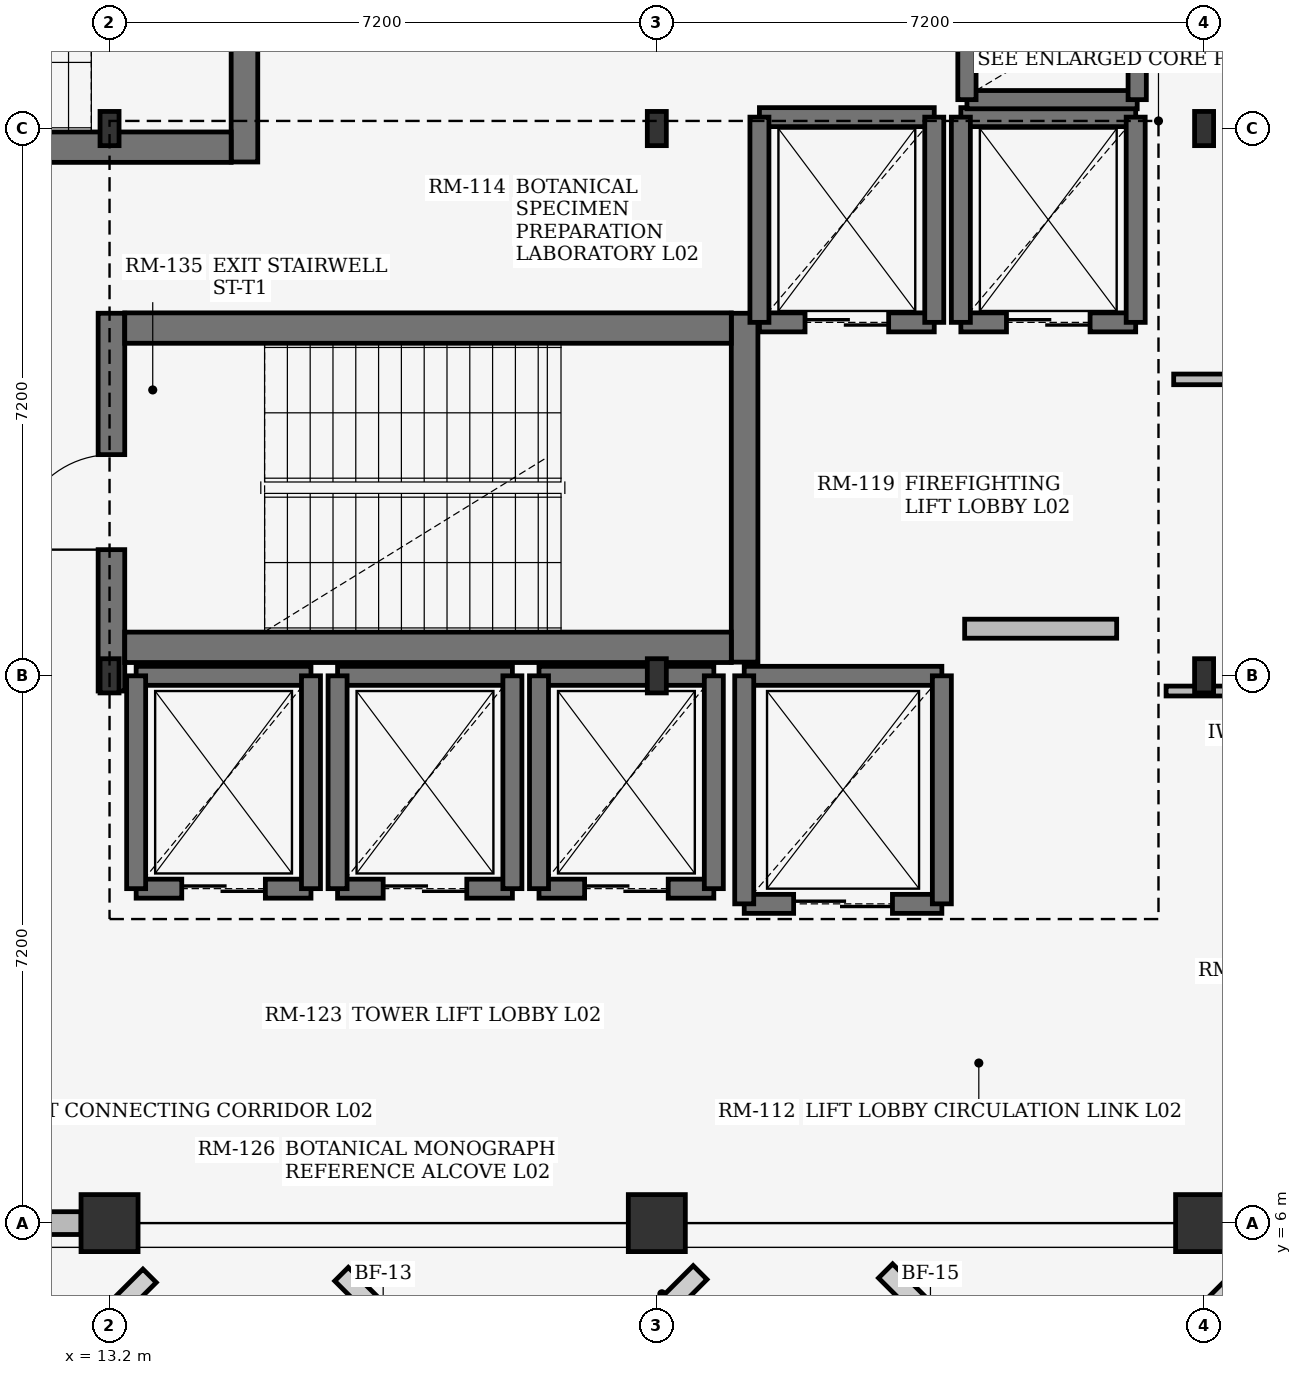
"""IFC4 building model, lengths in metres.
Left out: names, types, materials, properties, quantities, classifications, styles, units other than length and angle.
Written with IfcOpenShell. Run it as: python <this file> out.ifc"""

import sys

from ifc_helpers import new_model, si_unit, direction, frame, frame_2d, origin, origin_2d, place, context, subcontext, project, spatial, rectangle, i_section, extrude, element, fill, save


model = new_model("IFC4")
c1 = context("Model", 3, precision=1e-05, world=origin(), true_north=direction((0.0, 1.0)))
c2 = subcontext(c1, "Body", "Model", "MODEL_VIEW")
j1 = project(units=[si_unit("LENGTHUNIT", "METRE"), si_unit("PLANEANGLEUNIT", "RADIAN")], contexts=[c1])
p1 = place(None, origin())
s1 = spatial("IfcSite", under=j1, at=p1, CompositionType="ELEMENT")
p2 = place(p1, origin())
s2 = spatial("IfcBuilding", under=s1, at=p2, CompositionType="ELEMENT")
p3 = place(p2, frame((0.0, 0.0, 9.0)))
s3 = spatial("IfcBuildingStorey", under=s2, at=p3, CompositionType="ELEMENT", Elevation=9.0)
p4 = place(p3, frame((13.2, 6.0, 0.0), z_axis=(0.0, 0.0, 1.0), x_axis=(1.0, 0.0, 0.0)))
e1 = element("IfcColumn", 1, at=p4, inside=s3, PredefinedType="COLUMN", context=c2, shape_type="SweptSolid", body=[
    extrude(rectangle(XDim=0.75, YDim=0.75, at=origin_2d()), origin(), (0.0, 0.0, 1.0), 3.96),
])
for number, where, z_axis, x_axis in (
    (2, (13.2, 13.2, 0.0), (0.0, 0.0, 1.0), (1.0, 0.0, 0.0)),
    (3, (13.2, 20.4, 0.0), (0.0, 0.0, 1.0), (1.0, 0.0, 0.0)),
):
    element("IfcColumn", number, at=place(p3, frame(where, z_axis=z_axis, x_axis=x_axis)), inside=s3, PredefinedType="COLUMN", context=c2, shape_type="SweptSolid", body=[
        extrude(i_section(OverallWidth=0.25, OverallDepth=0.45, WebThickness=0.011, FlangeThickness=0.014, at=origin_2d()), origin(), (0.0, 0.0, 1.0), 3.96),
    ])
p5 = place(p3, frame((20.4, 6.0, 0.0), z_axis=(0.0, 0.0, 1.0), x_axis=(1.0, 0.0, 0.0)))
e4 = element("IfcColumn", 4, at=p5, inside=s3, PredefinedType="COLUMN", context=c2, shape_type="SweptSolid", body=[
    extrude(rectangle(XDim=0.75, YDim=0.75, at=origin_2d()), origin(), (0.0, 0.0, 1.0), 3.96),
])
for number, where, z_axis, x_axis in (
    (5, (20.4, 13.2, 0.0), (0.0, 0.0, 1.0), (1.0, 0.0, 0.0)),
    (6, (20.4, 20.4, 0.0), (0.0, 0.0, 1.0), (1.0, 0.0, 0.0)),
):
    element("IfcColumn", number, at=place(p3, frame(where, z_axis=z_axis, x_axis=x_axis)), inside=s3, PredefinedType="COLUMN", context=c2, shape_type="SweptSolid", body=[
        extrude(i_section(OverallWidth=0.25, OverallDepth=0.45, WebThickness=0.011, FlangeThickness=0.014, at=origin_2d()), origin(), (0.0, 0.0, 1.0), 3.96),
    ])
p6 = place(p3, frame((27.6, 6.0, 0.0), z_axis=(0.0, 0.0, 1.0), x_axis=(1.0, 0.0, 0.0)))
e7 = element("IfcColumn", 7, at=p6, inside=s3, PredefinedType="COLUMN", context=c2, shape_type="SweptSolid", body=[
    extrude(rectangle(XDim=0.75, YDim=0.75, at=origin_2d()), origin(), (0.0, 0.0, 1.0), 3.96),
])
for number, where, z_axis, x_axis in (
    (8, (27.6, 13.2, 0.0), (0.0, 0.0, 1.0), (1.0, 0.0, 0.0)),
    (9, (27.6, 20.4, 0.0), (0.0, 0.0, 1.0), (1.0, 0.0, 0.0)),
):
    element("IfcColumn", number, at=place(p3, frame(where, z_axis=z_axis, x_axis=x_axis)), inside=s3, PredefinedType="COLUMN", context=c2, shape_type="SweptSolid", body=[
        extrude(i_section(OverallWidth=0.25, OverallDepth=0.45, WebThickness=0.011, FlangeThickness=0.014, at=origin_2d()), origin(), (0.0, 0.0, 1.0), 3.96),
    ])
p7 = place(p3, frame((6.375, 6.0, 0.0), z_axis=(0.0, 0.0, 1.0), x_axis=(1.0, 0.0, 0.0)))
e10 = element("IfcWall", 10, at=p7, inside=s3, PredefinedType="STANDARD", context=c2, shape_type="SweptSolid", body=[
    extrude(rectangle(XDim=6.45, YDim=0.3, at=frame_2d((3.225, 0.0))), origin(), (0.0, 0.0, 1.0), 3.34),
])
p8 = place(p7, frame((2.55, 0.0, 0.75)))
e11 = element("IfcOpeningElement", 11, at=p8, cuts=e10, PredefinedType="OPENING", context=c2, shape_type="SweptSolid", body=[
    extrude(rectangle(XDim=1.35, YDim=1.5, at=frame_2d((0.675, 0.75))), frame((0.0, 0.16, 0.0), z_axis=(0.0, -1.0, 0.0), x_axis=(1.0, 0.0, 0.0)), (0.0, 0.0, 1.0), 0.32),
])
p9 = place(p3, frame((13.225, 13.0, 0.0), z_axis=(0.0, 0.0, 1.0), x_axis=(0.0, 1.0, 0.0)))
e12 = element("IfcWall", 12, at=p9, inside=s3, PredefinedType="SHEAR", context=c2, shape_type="SweptSolid", body=[
    extrude(rectangle(XDim=4.97, YDim=0.35, at=frame_2d((2.485, 0.0))), origin(), (0.0, 0.0, 1.0), 3.96),
])
p10 = place(p9, frame((1.86, 0.0, 0.0)))
e13 = element("IfcOpeningElement", 13, at=p10, cuts=e12, PredefinedType="OPENING", context=c2, shape_type="SweptSolid", body=[
    extrude(rectangle(XDim=1.25, YDim=2.2, at=frame_2d((0.625, 1.1))), frame((0.0, 0.185, 0.0), z_axis=(0.0, -1.0, 0.0), x_axis=(1.0, 0.0, 0.0)), (0.0, 0.0, 1.0), 0.37),
])
p11 = place(p3, frame((21.555, 13.38, 0.0), z_axis=(0.0, 0.0, 1.0), x_axis=(0.0, 1.0, 0.0)))
e14 = element("IfcWall", 14, at=p11, inside=s3, PredefinedType="SHEAR", context=c2, shape_type="SweptSolid", body=[
    extrude(rectangle(XDim=4.59, YDim=0.35, at=frame_2d((2.295, 0.0))), origin(), (0.0, 0.0, 1.0), 3.96),
])
for number, where, z_axis, x_axis in (
    (15, (13.4, 13.575, 0.0), (0.0, 0.0, 1.0), (1.0, 0.0, 0.0)),
    (16, (13.4, 17.775, 0.0), (0.0, 0.0, 1.0), (1.0, 0.0, 0.0)),
):
    element("IfcWall", number, at=place(p3, frame(where, z_axis=z_axis, x_axis=x_axis)), inside=s3, PredefinedType="SHEAR", context=c2, shape_type="SweptSolid", body=[
        extrude(rectangle(XDim=7.98, YDim=0.4, at=frame_2d((3.99, 0.0))), origin(), (0.0, 0.0, 1.0), 3.96),
    ])
p12 = place(p3, frame((14.975, 24.55, 0.0), z_axis=(0.0, 0.0, 1.0), x_axis=(0.0, -1.0, 0.0)))
e17 = element("IfcWall", 17, at=p12, inside=s3, PredefinedType="SHEAR", context=c2, shape_type="SweptSolid", body=[
    extrude(rectangle(XDim=4.59, YDim=0.35, at=frame_2d((2.295, 0.0))), origin(), (0.0, 0.0, 1.0), 3.96),
])
p13 = place(p12, frame((1.72, 0.0, 0.0)))
e18 = element("IfcOpeningElement", 18, at=p13, cuts=e17, PredefinedType="OPENING", context=c2, shape_type="SweptSolid", body=[
    extrude(rectangle(XDim=1.15, YDim=2.2, at=frame_2d((0.575, 1.1))), frame((0.0, 0.185, 0.0), z_axis=(0.0, -1.0, 0.0), x_axis=(1.0, 0.0, 0.0)), (0.0, 0.0, 1.0), 0.37),
])
p14 = place(p3, frame((14.8, 20.155, 0.0), z_axis=(0.0, 0.0, 1.0), x_axis=(-1.0, 0.0, 0.0)))
e19 = element("IfcWall", 19, at=p14, inside=s3, PredefinedType="SHEAR", context=c2, shape_type="SweptSolid", body=[
    extrude(rectangle(XDim=7.98, YDim=0.4, at=frame_2d((3.99, 0.0))), origin(), (0.0, 0.0, 1.0), 3.96),
])
p15 = place(p3, frame((21.75, 17.85, 0.0), z_axis=(0.0, 0.0, 1.0), x_axis=(1.0, 0.0, 0.0)))
e20 = element("IfcWall", 20, at=p15, inside=s3, PredefinedType="SHEAR", context=c2, shape_type="SweptSolid", body=[
    extrude(rectangle(XDim=2.3, YDim=0.25, at=frame_2d((1.15, 0.0))), origin(), (0.0, 0.0, 1.0), 3.96),
])
p16 = place(p15, frame((0.6, 0.0, 0.0)))
e21 = element("IfcOpeningElement", 21, at=p16, cuts=e20, PredefinedType="OPENING", context=c2, shape_type="SweptSolid", body=[
    extrude(rectangle(XDim=1.1, YDim=2.2, at=frame_2d((0.55, 1.1))), frame((0.0, 0.135, 0.0), z_axis=(0.0, -1.0, 0.0), x_axis=(1.0, 0.0, 0.0)), (0.0, 0.0, 1.0), 0.27),
])
p17 = place(p3, frame((21.75, 20.55, 0.0), z_axis=(0.0, 0.0, 1.0), x_axis=(1.0, 0.0, 0.0)))
e22 = element("IfcWall", 22, at=p17, inside=s3, PredefinedType="SHEAR", context=c2, shape_type="SweptSolid", body=[
    extrude(rectangle(XDim=2.3, YDim=0.25, at=frame_2d((1.15, 0.0))), origin(), (0.0, 0.0, 1.0), 3.96),
])
for number, where, z_axis, x_axis in (
    (23, (21.75, 17.85, 0.0), (0.0, 0.0, 1.0), (0.0, 1.0, 0.0)),
    (24, (24.05, 17.85, 0.0), (0.0, 0.0, 1.0), (0.0, 1.0, 0.0)),
):
    element("IfcWall", number, at=place(p3, frame(where, z_axis=z_axis, x_axis=x_axis)), inside=s3, PredefinedType="SHEAR", context=c2, shape_type="SweptSolid", body=[
        extrude(rectangle(XDim=2.7, YDim=0.25, at=frame_2d((1.35, 0.0))), origin(), (0.0, 0.0, 1.0), 3.96),
    ])
p18 = place(p3, frame((24.4, 17.85, 0.0), z_axis=(0.0, 0.0, 1.0), x_axis=(1.0, 0.0, 0.0)))
e25 = element("IfcWall", 25, at=p18, inside=s3, PredefinedType="SHEAR", context=c2, shape_type="SweptSolid", body=[
    extrude(rectangle(XDim=2.3, YDim=0.25, at=frame_2d((1.15, 0.0))), origin(), (0.0, 0.0, 1.0), 3.96),
])
p19 = place(p18, frame((0.6, 0.0, 0.0)))
e26 = element("IfcOpeningElement", 26, at=p19, cuts=e25, PredefinedType="OPENING", context=c2, shape_type="SweptSolid", body=[
    extrude(rectangle(XDim=1.1, YDim=2.2, at=frame_2d((0.55, 1.1))), frame((0.0, 0.135, 0.0), z_axis=(0.0, -1.0, 0.0), x_axis=(1.0, 0.0, 0.0)), (0.0, 0.0, 1.0), 0.27),
])
p20 = place(p3, frame((24.4, 20.55, 0.0), z_axis=(0.0, 0.0, 1.0), x_axis=(1.0, 0.0, 0.0)))
e27 = element("IfcWall", 27, at=p20, inside=s3, PredefinedType="SHEAR", context=c2, shape_type="SweptSolid", body=[
    extrude(rectangle(XDim=2.3, YDim=0.25, at=frame_2d((1.15, 0.0))), origin(), (0.0, 0.0, 1.0), 3.96),
])
for number, where, z_axis, x_axis in (
    (28, (24.4, 17.85, 0.0), (0.0, 0.0, 1.0), (0.0, 1.0, 0.0)),
    (29, (26.7, 17.85, 0.0), (0.0, 0.0, 1.0), (0.0, 1.0, 0.0)),
):
    element("IfcWall", number, at=place(p3, frame(where, z_axis=z_axis, x_axis=x_axis)), inside=s3, PredefinedType="SHEAR", context=c2, shape_type="SweptSolid", body=[
        extrude(rectangle(XDim=2.7, YDim=0.25, at=frame_2d((1.35, 0.0))), origin(), (0.0, 0.0, 1.0), 3.96),
    ])
p21 = place(p3, frame((13.55, 10.4, 0.0), z_axis=(0.0, 0.0, 1.0), x_axis=(1.0, 0.0, 0.0)))
e30 = element("IfcWall", 30, at=p21, inside=s3, PredefinedType="SHEAR", context=c2, shape_type="SweptSolid", body=[
    extrude(rectangle(XDim=2.3, YDim=0.25, at=frame_2d((1.15, 0.0))), origin(), (0.0, 0.0, 1.0), 3.96),
])
p22 = place(p21, frame((0.6, 0.0, 0.0)))
e31 = element("IfcOpeningElement", 31, at=p22, cuts=e30, PredefinedType="OPENING", context=c2, shape_type="SweptSolid", body=[
    extrude(rectangle(XDim=1.1, YDim=2.2, at=frame_2d((0.55, 1.1))), frame((0.0, 0.135, 0.0), z_axis=(0.0, -1.0, 0.0), x_axis=(1.0, 0.0, 0.0)), (0.0, 0.0, 1.0), 0.27),
])
p23 = place(p3, frame((13.55, 13.2, 0.0), z_axis=(0.0, 0.0, 1.0), x_axis=(1.0, 0.0, 0.0)))
e32 = element("IfcWall", 32, at=p23, inside=s3, PredefinedType="SHEAR", context=c2, shape_type="SweptSolid", body=[
    extrude(rectangle(XDim=2.3, YDim=0.25, at=frame_2d((1.15, 0.0))), origin(), (0.0, 0.0, 1.0), 3.96),
])
for number, where, z_axis, x_axis in (
    (33, (13.55, 10.4, 0.0), (0.0, 0.0, 1.0), (0.0, 1.0, 0.0)),
    (34, (15.85, 10.4, 0.0), (0.0, 0.0, 1.0), (0.0, 1.0, 0.0)),
):
    element("IfcWall", number, at=place(p3, frame(where, z_axis=z_axis, x_axis=x_axis)), inside=s3, PredefinedType="SHEAR", context=c2, shape_type="SweptSolid", body=[
        extrude(rectangle(XDim=2.8, YDim=0.25, at=frame_2d((1.4, 0.0))), origin(), (0.0, 0.0, 1.0), 3.96),
    ])
p24 = place(p3, frame((16.2, 10.4, 0.0), z_axis=(0.0, 0.0, 1.0), x_axis=(1.0, 0.0, 0.0)))
e35 = element("IfcWall", 35, at=p24, inside=s3, PredefinedType="SHEAR", context=c2, shape_type="SweptSolid", body=[
    extrude(rectangle(XDim=2.3, YDim=0.25, at=frame_2d((1.15, 0.0))), origin(), (0.0, 0.0, 1.0), 3.96),
])
p25 = place(p24, frame((0.6, 0.0, 0.0)))
e36 = element("IfcOpeningElement", 36, at=p25, cuts=e35, PredefinedType="OPENING", context=c2, shape_type="SweptSolid", body=[
    extrude(rectangle(XDim=1.1, YDim=2.2, at=frame_2d((0.55, 1.1))), frame((0.0, 0.135, 0.0), z_axis=(0.0, -1.0, 0.0), x_axis=(1.0, 0.0, 0.0)), (0.0, 0.0, 1.0), 0.27),
])
p26 = place(p3, frame((16.2, 13.2, 0.0), z_axis=(0.0, 0.0, 1.0), x_axis=(1.0, 0.0, 0.0)))
e37 = element("IfcWall", 37, at=p26, inside=s3, PredefinedType="SHEAR", context=c2, shape_type="SweptSolid", body=[
    extrude(rectangle(XDim=2.3, YDim=0.25, at=frame_2d((1.15, 0.0))), origin(), (0.0, 0.0, 1.0), 3.96),
])
for number, where, z_axis, x_axis in (
    (38, (16.2, 10.4, 0.0), (0.0, 0.0, 1.0), (0.0, 1.0, 0.0)),
    (39, (18.5, 10.4, 0.0), (0.0, 0.0, 1.0), (0.0, 1.0, 0.0)),
):
    element("IfcWall", number, at=place(p3, frame(where, z_axis=z_axis, x_axis=x_axis)), inside=s3, PredefinedType="SHEAR", context=c2, shape_type="SweptSolid", body=[
        extrude(rectangle(XDim=2.8, YDim=0.25, at=frame_2d((1.4, 0.0))), origin(), (0.0, 0.0, 1.0), 3.96),
    ])
p27 = place(p3, frame((18.85, 10.4, 0.0), z_axis=(0.0, 0.0, 1.0), x_axis=(1.0, 0.0, 0.0)))
e40 = element("IfcWall", 40, at=p27, inside=s3, PredefinedType="SHEAR", context=c2, shape_type="SweptSolid", body=[
    extrude(rectangle(XDim=2.3, YDim=0.25, at=frame_2d((1.15, 0.0))), origin(), (0.0, 0.0, 1.0), 3.96),
])
p28 = place(p27, frame((0.6, 0.0, 0.0)))
e41 = element("IfcOpeningElement", 41, at=p28, cuts=e40, PredefinedType="OPENING", context=c2, shape_type="SweptSolid", body=[
    extrude(rectangle(XDim=1.1, YDim=2.2, at=frame_2d((0.55, 1.1))), frame((0.0, 0.135, 0.0), z_axis=(0.0, -1.0, 0.0), x_axis=(1.0, 0.0, 0.0)), (0.0, 0.0, 1.0), 0.27),
])
p29 = place(p3, frame((18.85, 13.2, 0.0), z_axis=(0.0, 0.0, 1.0), x_axis=(1.0, 0.0, 0.0)))
e42 = element("IfcWall", 42, at=p29, inside=s3, PredefinedType="SHEAR", context=c2, shape_type="SweptSolid", body=[
    extrude(rectangle(XDim=2.3, YDim=0.25, at=frame_2d((1.15, 0.0))), origin(), (0.0, 0.0, 1.0), 3.96),
])
for number, where, z_axis, x_axis in (
    (43, (18.85, 10.4, 0.0), (0.0, 0.0, 1.0), (0.0, 1.0, 0.0)),
    (44, (21.15, 10.4, 0.0), (0.0, 0.0, 1.0), (0.0, 1.0, 0.0)),
):
    element("IfcWall", number, at=place(p3, frame(where, z_axis=z_axis, x_axis=x_axis)), inside=s3, PredefinedType="SHEAR", context=c2, shape_type="SweptSolid", body=[
        extrude(rectangle(XDim=2.8, YDim=0.25, at=frame_2d((1.4, 0.0))), origin(), (0.0, 0.0, 1.0), 3.96),
    ])
p30 = place(p3, frame((21.55, 10.2, 0.0), z_axis=(0.0, 0.0, 1.0), x_axis=(1.0, 0.0, 0.0)))
e45 = element("IfcWall", 45, at=p30, inside=s3, PredefinedType="SHEAR", context=c2, shape_type="SweptSolid", body=[
    extrude(rectangle(XDim=2.6, YDim=0.25, at=frame_2d((1.3, 0.0))), origin(), (0.0, 0.0, 1.0), 3.96),
])
p31 = place(p30, frame((0.65, 0.0, 0.0)))
e46 = element("IfcOpeningElement", 46, at=p31, cuts=e45, PredefinedType="OPENING", context=c2, shape_type="SweptSolid", body=[
    extrude(rectangle(XDim=1.3, YDim=2.25, at=frame_2d((0.65, 1.125))), frame((0.0, 0.135, 0.0), z_axis=(0.0, -1.0, 0.0), x_axis=(1.0, 0.0, 0.0)), (0.0, 0.0, 1.0), 0.27),
])
p32 = place(p3, frame((21.55, 13.2, 0.0), z_axis=(0.0, 0.0, 1.0), x_axis=(1.0, 0.0, 0.0)))
e47 = element("IfcWall", 47, at=p32, inside=s3, PredefinedType="SHEAR", context=c2, shape_type="SweptSolid", body=[
    extrude(rectangle(XDim=2.6, YDim=0.25, at=frame_2d((1.3, 0.0))), origin(), (0.0, 0.0, 1.0), 3.96),
])
for number, where, z_axis, x_axis in (
    (48, (21.55, 10.2, 0.0), (0.0, 0.0, 1.0), (0.0, 1.0, 0.0)),
    (49, (24.15, 10.2, 0.0), (0.0, 0.0, 1.0), (0.0, 1.0, 0.0)),
):
    element("IfcWall", number, at=place(p3, frame(where, z_axis=z_axis, x_axis=x_axis)), inside=s3, PredefinedType="SHEAR", context=c2, shape_type="SweptSolid", body=[
        extrude(rectangle(XDim=3.0, YDim=0.25, at=frame_2d((1.5, 0.0))), origin(), (0.0, 0.0, 1.0), 3.96),
    ])
p33 = place(p3, frame((24.48, 20.78, 0.0), z_axis=(0.0, 0.0, 1.0), x_axis=(1.0, 0.0, 0.0)))
e50 = element("IfcWall", 50, at=p33, inside=s3, PredefinedType="SHEAR", context=c2, shape_type="SweptSolid", body=[
    extrude(rectangle(XDim=2.24, YDim=0.24, at=frame_2d((1.12, 0.0))), origin(), (0.0, 0.0, 1.0), 3.96),
])
for number, where, z_axis, x_axis in (
    (51, (24.48, 20.78, 0.0), (0.0, 0.0, 1.0), (0.0, 1.0, 0.0)),
    (52, (26.72, 20.78, 0.0), (0.0, 0.0, 1.0), (0.0, 1.0, 0.0)),
):
    element("IfcWall", number, at=place(p3, frame(where, z_axis=z_axis, x_axis=x_axis)), inside=s3, PredefinedType="SHEAR", context=c2, shape_type="SweptSolid", body=[
        extrude(rectangle(XDim=2.94, YDim=0.24, at=frame_2d((1.47, 0.0))), origin(), (0.0, 0.0, 1.0), 3.96),
    ])
p34 = place(p3, frame((24.45, 13.82, 0.0), z_axis=(0.0, 0.0, 1.0), x_axis=(1.0, 0.0, 0.0)))
e53 = element("IfcWall", 53, at=p34, inside=s3, PredefinedType="SOLIDWALL", context=c2, shape_type="SweptSolid", body=[
    extrude(rectangle(XDim=2.0, YDim=0.25, at=frame_2d((1.0, 0.0))), origin(), (0.0, 0.0, 1.0), 3.94),
])
p35 = place(p3, frame((27.2, 17.1, 0.0), z_axis=(0.0, 0.0, 1.0), x_axis=(1.0, 0.0, 0.0)))
e54 = element("IfcWall", 54, at=p35, inside=s3, PredefinedType="PARTITIONING", context=c2, shape_type="SweptSolid", body=[
    extrude(rectangle(XDim=14.25, YDim=0.14, at=frame_2d((7.125, 0.0))), origin(), (0.0, 0.0, 1.0), 3.94),
])
p36 = place(p35, frame((6.525, 0.0, 0.0)))
e55 = element("IfcOpeningElement", 55, at=p36, cuts=e54, PredefinedType="OPENING", context=c2, shape_type="SweptSolid", body=[
    extrude(rectangle(XDim=1.2, YDim=2.2, at=frame_2d((0.6, 1.1))), frame((0.0, 0.08, 0.0), z_axis=(0.0, -1.0, 0.0), x_axis=(1.0, 0.0, 0.0)), (0.0, 0.0, 1.0), 0.16),
])
p37 = place(p3, frame((27.1, 13.0, 0.0), z_axis=(0.0, 0.0, 1.0), x_axis=(1.0, 0.0, 0.0)))
e56 = element("IfcWall", 56, at=p37, inside=s3, PredefinedType="PARTITIONING", context=c2, shape_type="SweptSolid", body=[
    extrude(rectangle(XDim=5.7, YDim=0.13, at=frame_2d((2.85, 0.0))), origin(), (0.0, 0.0, 1.0), 3.94),
])
p38 = place(p37, frame((2.2, 0.0, 0.0)))
e57 = element("IfcOpeningElement", 57, at=p38, cuts=e56, PredefinedType="OPENING", context=c2, shape_type="SweptSolid", body=[
    extrude(rectangle(XDim=1.3, YDim=2.2, at=frame_2d((0.65, 1.1))), frame((0.0, 0.075, 0.0), z_axis=(0.0, -1.0, 0.0), x_axis=(1.0, 0.0, 0.0)), (0.0, 0.0, 1.0), 0.15),
])
p39 = place(p10, origin())
e58 = element("IfcDoor", 58, at=p39, inside=s3, OperationType="SINGLE_SWING_LEFT", PredefinedType="DOOR", context=c2, shape_type="SweptSolid", body=[
    extrude(rectangle(XDim=1.25, YDim=2.2, at=frame_2d((0.625, 1.1))), frame((0.0, 0.025, 0.0), z_axis=(0.0, -1.0, 0.0), x_axis=(1.0, 0.0, 0.0)), (0.0, 0.0, 1.0), 0.05),
])
fill(e13, e58)
p40 = place(p16, origin())
e59 = element("IfcDoor", 59, at=p40, inside=s3, OperationType="DOUBLE_DOOR_SLIDING", PredefinedType="DOOR", context=c2, shape_type="SweptSolid", body=[
    extrude(rectangle(XDim=1.1, YDim=2.2, at=frame_2d((0.55, 1.1))), frame((0.0, 0.025, 0.0), z_axis=(0.0, -1.0, 0.0), x_axis=(1.0, 0.0, 0.0)), (0.0, 0.0, 1.0), 0.05),
])
fill(e21, e59)
p41 = place(p19, origin())
e60 = element("IfcDoor", 60, at=p41, inside=s3, OperationType="DOUBLE_DOOR_SLIDING", PredefinedType="DOOR", context=c2, shape_type="SweptSolid", body=[
    extrude(rectangle(XDim=1.1, YDim=2.2, at=frame_2d((0.55, 1.1))), frame((0.0, 0.025, 0.0), z_axis=(0.0, -1.0, 0.0), x_axis=(1.0, 0.0, 0.0)), (0.0, 0.0, 1.0), 0.05),
])
fill(e26, e60)
p42 = place(p22, origin())
e61 = element("IfcDoor", 61, at=p42, inside=s3, OperationType="DOUBLE_DOOR_SLIDING", PredefinedType="DOOR", context=c2, shape_type="SweptSolid", body=[
    extrude(rectangle(XDim=1.1, YDim=2.2, at=frame_2d((0.55, 1.1))), frame((0.0, 0.025, 0.0), z_axis=(0.0, -1.0, 0.0), x_axis=(1.0, 0.0, 0.0)), (0.0, 0.0, 1.0), 0.05),
])
fill(e31, e61)
p43 = place(p25, origin())
e62 = element("IfcDoor", 62, at=p43, inside=s3, OperationType="DOUBLE_DOOR_SLIDING", PredefinedType="DOOR", context=c2, shape_type="SweptSolid", body=[
    extrude(rectangle(XDim=1.1, YDim=2.2, at=frame_2d((0.55, 1.1))), frame((0.0, 0.025, 0.0), z_axis=(0.0, -1.0, 0.0), x_axis=(1.0, 0.0, 0.0)), (0.0, 0.0, 1.0), 0.05),
])
fill(e36, e62)
p44 = place(p28, origin())
e63 = element("IfcDoor", 63, at=p44, inside=s3, OperationType="DOUBLE_DOOR_SLIDING", PredefinedType="DOOR", context=c2, shape_type="SweptSolid", body=[
    extrude(rectangle(XDim=1.1, YDim=2.2, at=frame_2d((0.55, 1.1))), frame((0.0, 0.025, 0.0), z_axis=(0.0, -1.0, 0.0), x_axis=(1.0, 0.0, 0.0)), (0.0, 0.0, 1.0), 0.05),
])
fill(e41, e63)
p45 = place(p31, origin())
e64 = element("IfcDoor", 64, at=p45, inside=s3, OperationType="DOUBLE_DOOR_SLIDING", PredefinedType="DOOR", context=c2, shape_type="SweptSolid", body=[
    extrude(rectangle(XDim=1.3, YDim=2.25, at=frame_2d((0.65, 1.125))), frame((0.0, 0.025, 0.0), z_axis=(0.0, -1.0, 0.0), x_axis=(1.0, 0.0, 0.0)), (0.0, 0.0, 1.0), 0.05),
])
fill(e46, e64)
save(model, sys.argv[1])
